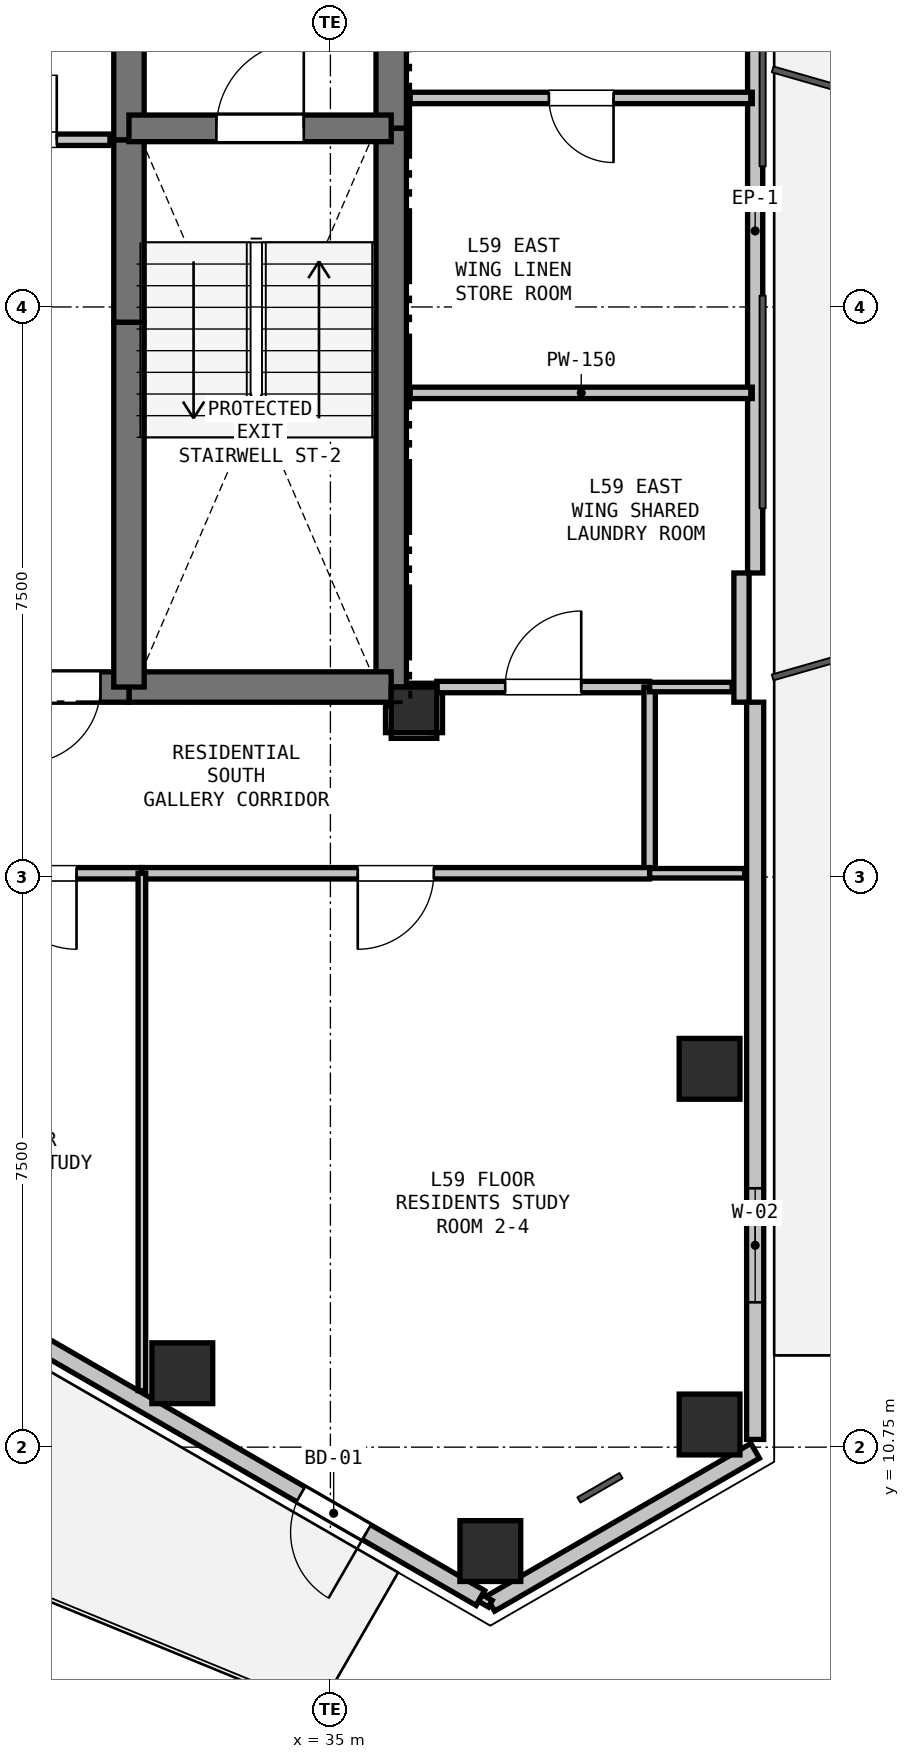
"""IFC4 building model, lengths in metres.
Left out: names, types, materials, properties, quantities, classifications, styles, units other than length and angle.
Written with IfcOpenShell. Run it as: python <this file> out.ifc"""

import sys

from ifc_helpers import new_model, si_unit, direction, frame, frame_2d, origin, origin_2d, place, context, subcontext, project, spatial, rectangle, hollow_rectangle, extrude, element, fill, save


model = new_model("IFC4")
c1 = context("Model", 3, precision=1e-05, world=origin(), true_north=direction((0.0, 1.0)))
c2 = subcontext(c1, "Body", "Model", "MODEL_VIEW")
j1 = project(units=[si_unit("LENGTHUNIT", "METRE"), si_unit("PLANEANGLEUNIT", "RADIAN")], contexts=[c1])
p1 = place(None, origin())
s1 = spatial("IfcSite", under=j1, at=p1, CompositionType="ELEMENT")
p2 = place(p1, origin())
s2 = spatial("IfcBuilding", under=s1, at=p2, CompositionType="ELEMENT")
p3 = place(p2, frame((0.0, 0.0, 211.8)))
s3 = spatial("IfcBuildingStorey", under=s2, at=p3, CompositionType="ELEMENT", Elevation=211.8)
p4 = place(p3, frame((36.1, 20.45, 0.0), z_axis=(0.0, 0.0, 1.0), x_axis=(1.0, 0.0, 0.0)))
e1 = element("IfcColumn", 1, at=p4, inside=s3, PredefinedType="COLUMN", context=c2, shape_type="SweptSolid", body=[
    extrude(rectangle(XDim=0.6, YDim=0.6, at=origin_2d()), origin(), (0.0, 0.0, 1.0), 3.3),
])
for number, where, z_axis, x_axis in (
    (2, (39.988, 15.727, 0.0), (0.0, 0.0, 1.0), (1.0, 0.0, 0.0)),
    (3, (39.988, 11.048, 0.0), (0.0, 0.0, 1.0), (1.0, 0.0, 0.0)),
    (4, (37.104, 9.383, 0.0), (0.0, 0.0, 1.0), (1.0, 0.0, 0.0)),
    (5, (33.052, 11.722, 0.0), (0.0, 0.0, 1.0), (1.0, 0.0, 0.0)),
):
    element("IfcColumn", number, at=place(p3, frame(where, z_axis=z_axis, x_axis=x_axis)), inside=s3, PredefinedType="COLUMN", context=c2, shape_type="SweptSolid", body=[
        extrude(hollow_rectangle(XDim=0.8, YDim=0.8, WallThickness=0.025, at=origin_2d()), origin(), (0.0, 0.0, 1.0), 3.3),
    ])
p5 = place(p3, frame((40.588, 10.702, 0.0), z_axis=(0.0, 0.0, 1.0), x_axis=(-0.866023907196, -0.500002592159, 0.0)))
e6 = element("IfcWall", 6, at=p5, inside=s3, PredefinedType="SOLIDWALL", context=c2, shape_type="SweptSolid", body=[
    extrude(rectangle(XDim=4.023, YDim=0.225, at=frame_2d((2.012, 0.0))), origin(), (0.0, 0.0, 1.0), 2.69),
])
p6 = place(p3, frame((40.588, 31.25, 0.0), z_axis=(0.0, 0.0, 1.0), x_axis=(0.0, -1.0, 0.0)))
e7 = element("IfcWall", 7, at=p6, inside=s3, PredefinedType="PARAPET", context=c2, shape_type="SweptSolid", body=[
    extrude(rectangle(XDim=8.999, YDim=0.2, at=frame_2d((4.5, 0.0))), origin(), (0.0, 0.0, 1.0), 0.2),
])
p7 = place(p3, frame((40.588, 20.551, 0.0), z_axis=(0.0, 0.0, 1.0), x_axis=(0.0, -1.0, 0.0)))
e8 = element("IfcWall", 8, at=p7, inside=s3, PredefinedType="SOLIDWALL", context=c2, shape_type="SweptSolid", body=[
    extrude(rectangle(XDim=9.699, YDim=0.225, at=frame_2d((4.85, 0.0))), origin(), (0.0, 0.0, 1.0), 2.69),
])
p8 = place(p7, frame((6.395, 0.0, 0.9)))
e9 = element("IfcOpeningElement", 9, at=p8, cuts=e8, PredefinedType="OPENING", context=c2, shape_type="SweptSolid", body=[
    extrude(rectangle(XDim=1.5, YDim=1.5, at=frame_2d((0.75, 0.75))), frame((0.0, 0.123, 0.0), z_axis=(0.0, -1.0, 0.0), x_axis=(1.0, 0.0, 0.0)), (0.0, 0.0, 1.0), 0.245),
])
p9 = place(p3, frame((40.408, 22.25, 0.0), z_axis=(0.0, 0.0, 1.0), x_axis=(0.0, -1.0, 0.0)))
e10 = element("IfcWall", 10, at=p9, inside=s3, PredefinedType="PARAPET", context=c2, shape_type="SweptSolid", body=[
    extrude(rectangle(XDim=1.7, YDim=0.2, at=frame_2d((0.85, 0.0))), origin(), (0.0, 0.0, 1.0), 2.69),
])
p10 = place(p3, frame((36.974, 8.765, 0.0), z_axis=(0.0, 0.0, 1.0), x_axis=(-0.866016233231, 0.500015883528, 0.0)))
e11 = element("IfcWall", 11, at=p10, inside=s3, PredefinedType="SOLIDWALL", context=c2, shape_type="SweptSolid", body=[
    extrude(rectangle(XDim=9.699, YDim=0.225, at=frame_2d((4.85, 0.0))), origin(), (0.0, 0.0, 1.0), 2.69),
])
p11 = place(p10, frame((1.73, 0.0, 0.0)))
e12 = element("IfcOpeningElement", 12, at=p11, cuts=e11, PredefinedType="OPENING", context=c2, shape_type="SweptSolid", body=[
    extrude(rectangle(XDim=1.0, YDim=2.1, at=frame_2d((0.5, 1.05))), frame((0.0, 0.123, 0.0), z_axis=(0.0, -1.0, 0.0), x_axis=(1.0, 0.0, 0.0)), (0.0, 0.0, 1.0), 0.245),
])
p12 = place(p3, frame((35.8, 32.75, 0.0), z_axis=(0.0, 0.0, 1.0), x_axis=(0.0, -1.0, 0.0)))
e13 = element("IfcWall", 13, at=p12, inside=s3, PredefinedType="SHEAR", context=c2, shape_type="SweptSolid", body=[
    extrude(rectangle(XDim=4.65, YDim=0.4, at=frame_2d((2.325, 0.0))), origin(), (0.0, 0.0, 1.0), 3.07),
])
p13 = place(p3, frame((35.8, 28.1, 0.0), z_axis=(0.0, 0.0, 1.0), x_axis=(0.0, -1.0, 0.0)))
e14 = element("IfcWall", 14, at=p13, inside=s3, PredefinedType="SHEAR", context=c2, shape_type="SweptSolid", body=[
    extrude(rectangle(XDim=7.35, YDim=0.4, at=frame_2d((3.675, 0.0))), origin(), (0.0, 0.0, 1.0), 3.07),
])
p14 = place(p3, frame((35.8, 20.75, 0.0), z_axis=(0.0, 0.0, 1.0), x_axis=(-1.0, 0.0, 0.0)))
e15 = element("IfcWall", 15, at=p14, inside=s3, PredefinedType="SHEAR", context=c2, shape_type="SweptSolid", body=[
    extrude(rectangle(XDim=3.45, YDim=0.4, at=frame_2d((1.725, 0.0))), origin(), (0.0, 0.0, 1.0), 3.07),
])
p15 = place(p3, frame((32.35, 20.75, 0.0), z_axis=(0.0, 0.0, 1.0), x_axis=(-1.0, 0.0, 0.0)))
e16 = element("IfcWall", 16, at=p15, inside=s3, PredefinedType="SHEAR", context=c2, shape_type="SweptSolid", body=[
    extrude(rectangle(XDim=1.75, YDim=0.4, at=frame_2d((0.875, 0.0))), origin(), (0.0, 0.0, 1.0), 3.07),
])
p16 = place(p15, frame((0.375, 0.0, 0.0)))
e17 = element("IfcOpeningElement", 17, at=p16, cuts=e16, PredefinedType="OPENING", context=c2, shape_type="SweptSolid", body=[
    extrude(rectangle(XDim=1.0, YDim=2.15, at=frame_2d((0.5, 1.075))), frame((0.0, 0.21, 0.0), z_axis=(0.0, -1.0, 0.0), x_axis=(1.0, 0.0, 0.0)), (0.0, 0.0, 1.0), 0.42),
])
p17 = place(p3, frame((32.35, 20.75, 0.0), z_axis=(0.0, 0.0, 1.0), x_axis=(0.0, 1.0, 0.0)))
e18 = element("IfcWall", 18, at=p17, inside=s3, PredefinedType="SHEAR", context=c2, shape_type="SweptSolid", body=[
    extrude(rectangle(XDim=4.8, YDim=0.4, at=frame_2d((2.4, 0.0))), origin(), (0.0, 0.0, 1.0), 3.07),
])
p18 = place(p3, frame((32.35, 25.55, 0.0), z_axis=(0.0, 0.0, 1.0), x_axis=(0.0, 1.0, 0.0)))
e19 = element("IfcWall", 19, at=p18, inside=s3, PredefinedType="SHEAR", context=c2, shape_type="SweptSolid", body=[
    extrude(rectangle(XDim=2.4, YDim=0.4, at=frame_2d((1.2, 0.0))), origin(), (0.0, 0.0, 1.0), 3.07),
])
p19 = place(p3, frame((32.35, 27.95, 0.0), z_axis=(0.0, 0.0, 1.0), x_axis=(0.0, 1.0, 0.0)))
e20 = element("IfcWall", 20, at=p19, inside=s3, PredefinedType="SHEAR", context=c2, shape_type="SweptSolid", body=[
    extrude(rectangle(XDim=2.8, YDim=0.4, at=frame_2d((1.4, 0.0))), origin(), (0.0, 0.0, 1.0), 3.07),
])
p20 = place(p3, frame((32.35, 28.1, 0.0), z_axis=(0.0, 0.0, 1.0), x_axis=(1.0, 0.0, 0.0)))
e21 = element("IfcWall", 21, at=p20, inside=s3, PredefinedType="SHEAR", context=c2, shape_type="SweptSolid", body=[
    extrude(rectangle(XDim=3.45, YDim=0.35, at=frame_2d((1.725, 0.0))), origin(), (0.0, 0.0, 1.0), 3.07),
])
p21 = place(p20, frame((1.15, 0.0, 0.0)))
e22 = element("IfcOpeningElement", 22, at=p21, cuts=e21, PredefinedType="OPENING", context=c2, shape_type="SweptSolid", body=[
    extrude(rectangle(XDim=1.15, YDim=2.15, at=frame_2d((0.575, 1.075))), frame((0.0, 0.185, 0.0), z_axis=(0.0, -1.0, 0.0), x_axis=(1.0, 0.0, 0.0)), (0.0, 0.0, 1.0), 0.37),
])
p22 = place(p3, frame((29.85, 27.95, 0.0), z_axis=(0.0, 0.0, 1.0), x_axis=(1.0, 0.0, 0.0)))
e23 = element("IfcWall", 23, at=p22, inside=s3, PredefinedType="PARTITIONING", context=c2, shape_type="SweptSolid", body=[
    extrude(rectangle(XDim=2.25, YDim=0.15, at=frame_2d((1.125, 0.0))), origin(), (0.0, 0.0, 1.0), 3.07),
])
p23 = place(p22, frame((0.7, 0.0, 0.0)))
e24 = element("IfcOpeningElement", 24, at=p23, cuts=e23, PredefinedType="OPENING", context=c2, shape_type="SweptSolid", body=[
    extrude(rectangle(XDim=0.85, YDim=2.1, at=frame_2d((0.425, 1.05))), frame((0.0, 0.085, 0.0), z_axis=(0.0, -1.0, 0.0), x_axis=(1.0, 0.0, 0.0)), (0.0, 0.0, 1.0), 0.17),
])
p24 = place(p3, frame((35.8, 20.5, 0.0), z_axis=(0.0, 0.0, 1.0), x_axis=(0.0, -1.0, 0.0)))
e25 = element("IfcWall", 25, at=p24, inside=s3, PredefinedType="PARTITIONING", context=c2, shape_type="SweptSolid", body=[
    extrude(rectangle(XDim=0.35, YDim=0.15, at=frame_2d((0.175, 0.0))), origin(), (0.0, 0.0, 1.0), 2.595),
])
p25 = place(p3, frame((35.8, 20.15, 0.0), z_axis=(0.0, 0.0, 1.0), x_axis=(1.0, 0.0, 0.0)))
e26 = element("IfcWall", 26, at=p25, inside=s3, PredefinedType="PARTITIONING", context=c2, shape_type="SweptSolid", body=[
    extrude(rectangle(XDim=0.6, YDim=0.15, at=frame_2d((0.3, 0.0))), origin(), (0.0, 0.0, 1.0), 2.518),
])
p26 = place(p3, frame((36.4, 20.15, 0.0), z_axis=(0.0, 0.0, 1.0), x_axis=(0.0, 1.0, 0.0)))
e27 = element("IfcWall", 27, at=p26, inside=s3, PredefinedType="PARTITIONING", context=c2, shape_type="SweptSolid", body=[
    extrude(rectangle(XDim=0.6, YDim=0.15, at=frame_2d((0.3, 0.0))), origin(), (0.0, 0.0, 1.0), 2.518),
])
p27 = place(p3, frame((36.4, 20.75, 0.0), z_axis=(0.0, 0.0, 1.0), x_axis=(1.0, 0.0, 0.0)))
e28 = element("IfcWall", 28, at=p27, inside=s3, PredefinedType="PARTITIONING", context=c2, shape_type="SweptSolid", body=[
    extrude(rectangle(XDim=2.8, YDim=0.15, at=frame_2d((1.4, 0.0))), origin(), (0.0, 0.0, 1.0), 3.07),
])
p28 = place(p27, frame((0.9, 0.0, 0.0)))
e29 = element("IfcOpeningElement", 29, at=p28, cuts=e28, PredefinedType="OPENING", context=c2, shape_type="SweptSolid", body=[
    extrude(rectangle(XDim=1.0, YDim=2.15, at=frame_2d((0.5, 1.075))), frame((0.0, 0.085, 0.0), z_axis=(0.0, -1.0, 0.0), x_axis=(1.0, 0.0, 0.0)), (0.0, 0.0, 1.0), 0.17),
])
p29 = place(p3, frame((39.2, 20.75, 0.0), z_axis=(0.0, 0.0, 1.0), x_axis=(0.0, -1.0, 0.0)))
e30 = element("IfcWall", 30, at=p29, inside=s3, PredefinedType="PARTITIONING", context=c2, shape_type="SweptSolid", body=[
    extrude(rectangle(XDim=2.45, YDim=0.15, at=frame_2d((1.225, 0.0))), origin(), (0.0, 0.0, 1.0), 3.07),
])
p30 = place(p3, frame((39.2, 18.3, 0.0), z_axis=(0.0, 0.0, 1.0), x_axis=(-1.0, 0.0, 0.0)))
e31 = element("IfcWall", 31, at=p30, inside=s3, PredefinedType="PARTITIONING", context=c2, shape_type="SweptSolid", body=[
    extrude(rectangle(XDim=6.68, YDim=0.15, at=frame_2d((3.34, 0.0))), origin(), (0.0, 0.0, 1.0), 2.518),
])
p31 = place(p30, frame((2.84, 0.0, 0.0)))
e32 = element("IfcOpeningElement", 32, at=p31, cuts=e31, PredefinedType="OPENING", context=c2, shape_type="SweptSolid", body=[
    extrude(rectangle(XDim=1.0, YDim=2.15, at=frame_2d((0.5, 1.075))), frame((0.0, 0.085, 0.0), z_axis=(0.0, -1.0, 0.0), x_axis=(1.0, 0.0, 0.0)), (0.0, 0.0, 1.0), 0.17),
])
p32 = place(p3, frame((32.52, 18.3, 0.0), z_axis=(0.0, 0.0, 1.0), x_axis=(-1.0, 0.0, 0.0)))
e33 = element("IfcWall", 33, at=p32, inside=s3, PredefinedType="PARTITIONING", context=c2, shape_type="SweptSolid", body=[
    extrude(rectangle(XDim=2.72, YDim=0.15, at=frame_2d((1.36, 0.0))), origin(), (0.0, 0.0, 1.0), 3.07),
])
p33 = place(p32, frame((0.86, 0.0, 0.0)))
e34 = element("IfcOpeningElement", 34, at=p33, cuts=e33, PredefinedType="OPENING", context=c2, shape_type="SweptSolid", body=[
    extrude(rectangle(XDim=1.0, YDim=2.15, at=frame_2d((0.5, 1.075))), frame((0.0, 0.085, 0.0), z_axis=(0.0, -1.0, 0.0), x_axis=(1.0, 0.0, 0.0)), (0.0, 0.0, 1.0), 0.17),
])
p34 = place(p3, frame((40.55, 28.5, 0.0), z_axis=(0.0, 0.0, 1.0), x_axis=(-1.0, 0.0, 0.0)))
e35 = element("IfcWall", 35, at=p34, inside=s3, PredefinedType="PARTITIONING", context=c2, shape_type="SweptSolid", body=[
    extrude(rectangle(XDim=4.5, YDim=0.15, at=frame_2d((2.25, 0.0))), origin(), (0.0, 0.0, 1.0), 2.365),
])
p35 = place(p34, frame((1.825, 0.0, 0.0)))
e36 = element("IfcOpeningElement", 36, at=p35, cuts=e35, PredefinedType="OPENING", context=c2, shape_type="SweptSolid", body=[
    extrude(rectangle(XDim=0.85, YDim=2.1, at=frame_2d((0.425, 1.05))), frame((0.0, 0.085, 0.0), z_axis=(0.0, -1.0, 0.0), x_axis=(1.0, 0.0, 0.0)), (0.0, 0.0, 1.0), 0.17),
])
p36 = place(p3, frame((40.284, 20.75, 0.0), z_axis=(0.0, 0.0, 1.0), x_axis=(-1.0, 0.0, 0.0)))
e37 = element("IfcWall", 37, at=p36, inside=s3, PredefinedType="PARTITIONING", context=c2, shape_type="SweptSolid", body=[
    extrude(rectangle(XDim=1.084, YDim=0.125, at=frame_2d((0.542, 0.0))), origin(), (0.0, 0.0, 1.0), 2.365),
])
p37 = place(p3, frame((36.4, 20.75, 0.0), z_axis=(0.0, 0.0, 1.0), x_axis=(-1.0, 0.0, 0.0)))
e38 = element("IfcWall", 38, at=p37, inside=s3, PredefinedType="PARTITIONING", context=c2, shape_type="SweptSolid", body=[
    extrude(rectangle(XDim=0.35, YDim=0.1, at=frame_2d((0.175, 0.0))), origin(), (0.0, 0.0, 1.0), 2.595),
])
p38 = place(p3, frame((36.05, 24.62, 0.0), z_axis=(0.0, 0.0, 1.0), x_axis=(1.0, 0.0, 0.0)))
e39 = element("IfcWall", 39, at=p38, inside=s3, PredefinedType="PARTITIONING", context=c2, shape_type="SweptSolid", body=[
    extrude(rectangle(XDim=4.5, YDim=0.15, at=frame_2d((2.25, 0.0))), origin(), (0.0, 0.0, 1.0), 2.365),
])
p39 = place(p3, frame((32.52, 18.3, 0.0), z_axis=(0.0, 0.0, 1.0), x_axis=(0.0, -1.0, 0.0)))
e40 = element("IfcWall", 40, at=p39, inside=s3, PredefinedType="PARTITIONING", context=c2, shape_type="SweptSolid", body=[
    extrude(rectangle(XDim=6.806, YDim=0.1, at=frame_2d((3.403, 0.0))), origin(), (0.0, 0.0, 1.0), 2.365),
])
p40 = place(p3, frame((39.2, 18.3, 0.0), z_axis=(0.0, 0.0, 1.0), x_axis=(1.0, 0.0, 0.0)))
e41 = element("IfcWall", 41, at=p40, inside=s3, PredefinedType="PARTITIONING", context=c2, shape_type="SweptSolid", body=[
    extrude(rectangle(XDim=1.252, YDim=0.125, at=frame_2d((0.626, 0.0))), origin(), (0.0, 0.0, 1.0), 2.365),
])
p41 = place(p3, frame((37.104, 8.69, 0.0), z_axis=(0.0, 0.0, 1.0), x_axis=(-0.866131372301, 0.499816412211, 0.0)))
e42 = element("IfcWall", 42, at=p41, inside=s3, PredefinedType="PARTITIONING", context=c2, shape_type="SweptSolid", body=[
    extrude(rectangle(XDim=0.15, YDim=0.1, at=frame_2d((0.075, 0.0))), origin(), (0.0, 0.0, 1.0), 3.07),
])
p42 = place(p8, origin())
e43 = element("IfcWindow", 43, at=p42, inside=s3, PartitioningType="SINGLE_PANEL", PredefinedType="WINDOW", context=c2, shape_type="SweptSolid", body=[
    extrude(rectangle(XDim=1.5, YDim=1.5, at=frame_2d((0.75, 0.75))), frame((0.0, 0.03, 0.0), z_axis=(0.0, -1.0, 0.0), x_axis=(1.0, 0.0, 0.0)), (0.0, 0.0, 1.0), 0.06),
])
fill(e9, e43)
p43 = place(p11, origin())
e44 = element("IfcDoor", 44, at=p43, inside=s3, OperationType="SINGLE_SWING_LEFT", PredefinedType="DOOR", context=c2, shape_type="SweptSolid", body=[
    extrude(rectangle(XDim=1.0, YDim=2.1, at=frame_2d((0.5, 1.05))), frame((0.0, 0.025, 0.0), z_axis=(0.0, -1.0, 0.0), x_axis=(1.0, 0.0, 0.0)), (0.0, 0.0, 1.0), 0.05),
])
fill(e12, e44)
p44 = place(p16, origin())
e45 = element("IfcDoor", 45, at=p44, inside=s3, OperationType="SINGLE_SWING_RIGHT", PredefinedType="DOOR", context=c2, shape_type="SweptSolid", body=[
    extrude(rectangle(XDim=1.0, YDim=2.15, at=frame_2d((0.5, 1.075))), frame((0.0, 0.025, 0.0), z_axis=(0.0, -1.0, 0.0), x_axis=(1.0, 0.0, 0.0)), (0.0, 0.0, 1.0), 0.05),
])
fill(e17, e45)
p45 = place(p21, origin())
e46 = element("IfcDoor", 46, at=p45, inside=s3, OperationType="SINGLE_SWING_RIGHT", PredefinedType="DOOR", context=c2, shape_type="SweptSolid", body=[
    extrude(rectangle(XDim=1.15, YDim=2.15, at=frame_2d((0.575, 1.075))), frame((0.0, 0.025, 0.0), z_axis=(0.0, -1.0, 0.0), x_axis=(1.0, 0.0, 0.0)), (0.0, 0.0, 1.0), 0.05),
])
fill(e22, e46)
p46 = place(p23, origin())
e47 = element("IfcDoor", 47, at=p46, inside=s3, OperationType="SINGLE_SWING_RIGHT", PredefinedType="DOOR", context=c2, shape_type="SweptSolid", body=[
    extrude(rectangle(XDim=0.85, YDim=2.1, at=frame_2d((0.425, 1.05))), frame((0.0, 0.025, 0.0), z_axis=(0.0, -1.0, 0.0), x_axis=(1.0, 0.0, 0.0)), (0.0, 0.0, 1.0), 0.05),
])
fill(e24, e47)
p47 = place(p28, origin())
e48 = element("IfcDoor", 48, at=p47, inside=s3, OperationType="SINGLE_SWING_RIGHT", PredefinedType="DOOR", context=c2, shape_type="SweptSolid", body=[
    extrude(rectangle(XDim=1.0, YDim=2.15, at=frame_2d((0.5, 1.075))), frame((0.0, 0.025, 0.0), z_axis=(0.0, -1.0, 0.0), x_axis=(1.0, 0.0, 0.0)), (0.0, 0.0, 1.0), 0.05),
])
fill(e29, e48)
p48 = place(p33, origin())
e49 = element("IfcDoor", 49, at=p48, inside=s3, OperationType="SINGLE_SWING_LEFT", PredefinedType="DOOR", context=c2, shape_type="SweptSolid", body=[
    extrude(rectangle(XDim=1.0, YDim=2.15, at=frame_2d((0.5, 1.075))), frame((0.0, 0.025, 0.0), z_axis=(0.0, -1.0, 0.0), x_axis=(1.0, 0.0, 0.0)), (0.0, 0.0, 1.0), 0.05),
])
fill(e34, e49)
p49 = place(p31, origin())
e50 = element("IfcDoor", 50, at=p49, inside=s3, OperationType="SINGLE_SWING_RIGHT", PredefinedType="DOOR", context=c2, shape_type="SweptSolid", body=[
    extrude(rectangle(XDim=1.0, YDim=2.15, at=frame_2d((0.5, 1.075))), frame((0.0, 0.025, 0.0), z_axis=(0.0, -1.0, 0.0), x_axis=(1.0, 0.0, 0.0)), (0.0, 0.0, 1.0), 0.05),
])
fill(e32, e50)
p50 = place(p35, origin())
e51 = element("IfcDoor", 51, at=p50, inside=s3, OperationType="SINGLE_SWING_LEFT", PredefinedType="DOOR", context=c2, shape_type="SweptSolid", body=[
    extrude(rectangle(XDim=0.85, YDim=2.1, at=frame_2d((0.425, 1.05))), frame((0.0, 0.025, 0.0), z_axis=(0.0, -1.0, 0.0), x_axis=(1.0, 0.0, 0.0)), (0.0, 0.0, 1.0), 0.05),
])
fill(e36, e51)
save(model, sys.argv[1])
